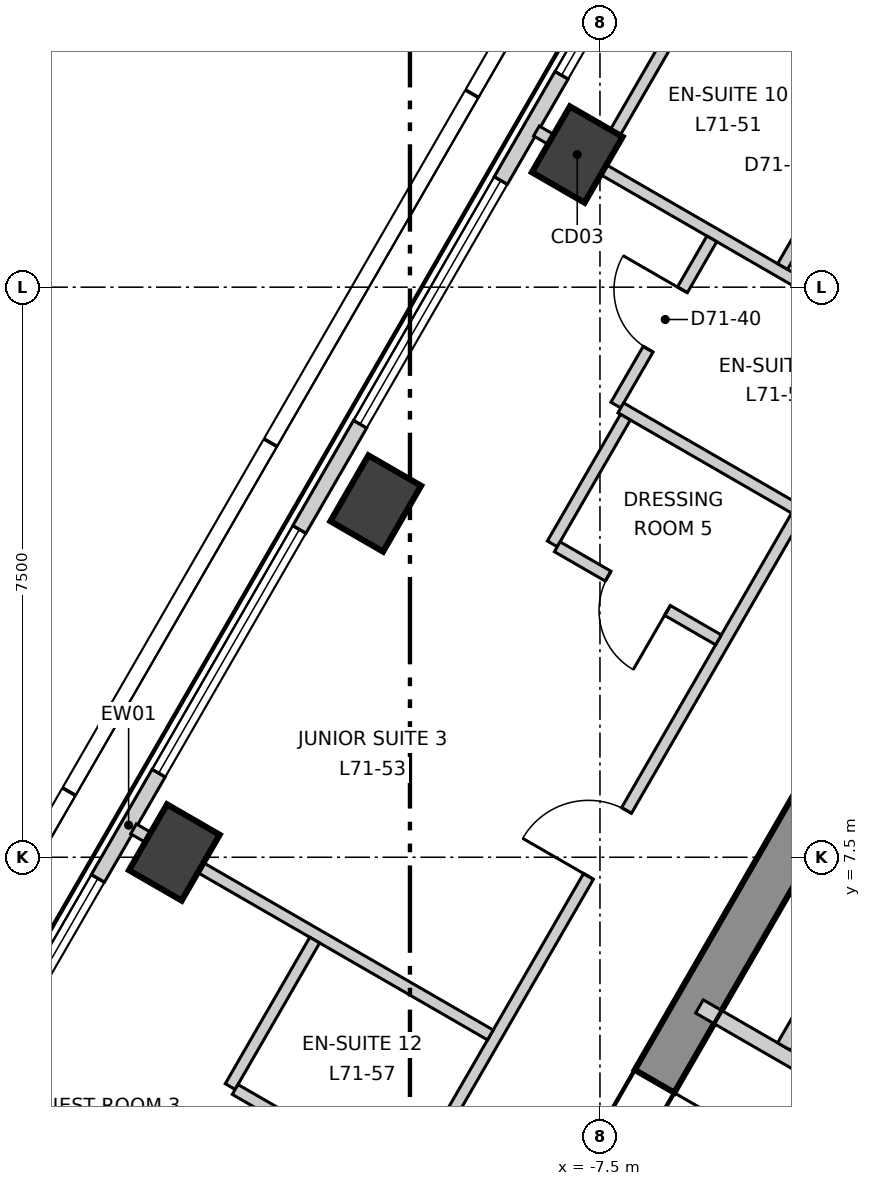
"""IFC4 building model, lengths in metres.
Left out: names, types, materials, properties, quantities, classifications, styles, units other than length and angle.
Written with IfcOpenShell. Run it as: python <this file> out.ifc"""

import sys

from ifc_helpers import new_model, si_unit, direction, frame, frame_2d, origin, origin_2d, place, context, subcontext, project, spatial, polyline, rectangle, outline, extrude, element, fill, save


model = new_model("IFC4")
c1 = context("Model", 3, precision=1e-05, world=origin(), true_north=direction((0.0, 1.0)))
c2 = subcontext(c1, "Body", "Model", "MODEL_VIEW")
j1 = project(units=[si_unit("LENGTHUNIT", "METRE"), si_unit("PLANEANGLEUNIT", "RADIAN")], contexts=[c1])
p1 = place(None, origin())
s1 = spatial("IfcSite", under=j1, at=p1, CompositionType="ELEMENT")
p2 = place(p1, origin())
s2 = spatial("IfcBuilding", under=s1, at=p2, CompositionType="ELEMENT")
p3 = place(p2, frame((0.0, 0.0, 300.7)))
s3 = spatial("IfcBuildingStorey", under=s2, at=p3, CompositionType="ELEMENT", Elevation=300.7)
p4 = place(p3, frame((-1.732, 13.3, -0.3), z_axis=(0.0, 0.0, 1.0), x_axis=(-0.500000539815, -0.866025092122, 0.0)))
e1 = element("IfcWall", 1, at=p4, inside=s3, PredefinedType="SHEAR", context=c2, shape_type="SweptSolid", body=[
    extrude(outline(polyline([(-0.173, -0.3), (1.795, -0.3), (3.763, -0.3), (5.732, -0.3), (7.7, -0.3), (9.668, -0.301), (11.637, -0.301), (13.605, -0.301), (15.573, -0.301), (17.542, -0.301), (19.51, -0.301), (21.478, -0.301), (21.131, 0.3), (19.226, 0.3), (17.321, 0.3), (15.415, 0.3), (13.51, 0.3), (11.605, 0.3), (9.699, 0.3), (7.794, 0.3), (5.889, 0.3), (3.984, 0.3), (2.078, 0.3), (0.173, 0.3), (-0.173, -0.3)])), origin(), (0.0, 0.0, 1.0), 3.6),
])
p5 = place(p4, frame((10.102, 0.0, 0.3)))
e2 = element("IfcOpeningElement", 2, at=p5, cuts=e1, PredefinedType="OPENING", context=c2, shape_type="SweptSolid", body=[
    extrude(rectangle(XDim=1.1, YDim=2.1, at=frame_2d((0.55, 1.05))), frame((0.0, 0.31, 0.0), z_axis=(0.0, -1.0, 0.0), x_axis=(1.0, 0.0, 0.0)), (0.0, 0.0, 1.0), 0.621),
])
p6 = place(p4, frame((16.378, 0.0, 0.3)))
e3 = element("IfcOpeningElement", 3, at=p6, cuts=e1, PredefinedType="OPENING", context=c2, shape_type="SweptSolid", body=[
    extrude(rectangle(XDim=0.9, YDim=2.1, at=frame_2d((0.45, 1.05))), frame((0.0, 0.31, 0.0), z_axis=(0.0, -1.0, 0.0), x_axis=(1.0, 0.0, 0.0)), (0.0, 0.0, 1.0), 0.621),
])
p7 = place(p4, frame((4.026, 0.0, 0.3)))
e4 = element("IfcOpeningElement", 4, at=p7, cuts=e1, PredefinedType="OPENING", context=c2, shape_type="SweptSolid", body=[
    extrude(rectangle(XDim=0.9, YDim=2.1, at=frame_2d((0.45, 1.05))), frame((0.0, 0.31, 0.0), z_axis=(0.0, -1.0, 0.0), x_axis=(1.0, 0.0, 0.0)), (0.0, 0.0, 1.0), 0.621),
])
for number, where, z_axis, x_axis in (
    (5, (-7.799, 16.745, -0.3), (0.0, 0.0, 1.0), (0.5, 0.866, 0.0)),
    (6, (-10.45, 12.154, -0.3), (0.0, 0.0, 1.0), (0.5, 0.866, 0.0)),
    (7, (-13.1, 7.563, -0.3), (0.0, 0.0, 1.0), (0.5, 0.866, 0.0)),
):
    element("IfcColumn", number, at=place(p3, frame(where, z_axis=z_axis, x_axis=x_axis)), inside=s3, PredefinedType="COLUMN", context=c2, shape_type="SweptSolid", body=[
        extrude(rectangle(XDim=1.0, YDim=0.8, at=origin_2d()), origin(), (0.0, 0.0, 1.0), 3.6),
    ])
p8 = place(p3, frame((-2.453, 27.405, 0.0), z_axis=(0.0, 0.0, 1.0), x_axis=(-0.500000041859, -0.866025379617, 0.0)))
e8 = element("IfcWall", 8, at=p8, inside=s3, PredefinedType="ELEMENTEDWALL", context=c2, shape_type="SweptSolid", body=[
    extrude(rectangle(XDim=44.994, YDim=0.2, at=frame_2d((22.497, 0.0))), origin(), (0.0, 0.0, 1.0), 3.3),
])
p9 = place(p8, frame((2.103, 0.0, 0.9)))
e9 = element("IfcOpeningElement", 9, at=p9, cuts=e8, PredefinedType="OPENING", context=c2, shape_type="SweptSolid", body=[
    extrude(rectangle(XDim=3.7, YDim=2.2, at=frame_2d((1.85, 1.1))), frame((0.0, 0.11, 0.0), z_axis=(0.0, -1.0, 0.0), x_axis=(1.0, 0.0, 0.0)), (0.0, 0.0, 1.0), 0.22),
])
p10 = place(p8, frame((7.404, 0.0, 0.9)))
e10 = element("IfcOpeningElement", 10, at=p10, cuts=e8, PredefinedType="OPENING", context=c2, shape_type="SweptSolid", body=[
    extrude(rectangle(XDim=3.7, YDim=2.2, at=frame_2d((1.85, 1.1))), frame((0.0, 0.11, 0.0), z_axis=(0.0, -1.0, 0.0), x_axis=(1.0, 0.0, 0.0)), (0.0, 0.0, 1.0), 0.22),
])
p11 = place(p8, frame((12.705, 0.0, 0.9)))
e11 = element("IfcOpeningElement", 11, at=p11, cuts=e8, PredefinedType="OPENING", context=c2, shape_type="SweptSolid", body=[
    extrude(rectangle(XDim=3.7, YDim=2.2, at=frame_2d((1.85, 1.1))), frame((0.0, 0.11, 0.0), z_axis=(0.0, -1.0, 0.0), x_axis=(1.0, 0.0, 0.0)), (0.0, 0.0, 1.0), 0.22),
])
p12 = place(p8, frame((18.006, 0.0, 0.9)))
e12 = element("IfcOpeningElement", 12, at=p12, cuts=e8, PredefinedType="OPENING", context=c2, shape_type="SweptSolid", body=[
    extrude(rectangle(XDim=3.7, YDim=2.2, at=frame_2d((1.85, 1.1))), frame((0.0, 0.11, 0.0), z_axis=(0.0, -1.0, 0.0), x_axis=(1.0, 0.0, 0.0)), (0.0, 0.0, 1.0), 0.22),
])
p13 = place(p8, frame((23.307, 0.0, 0.9)))
e13 = element("IfcOpeningElement", 13, at=p13, cuts=e8, PredefinedType="OPENING", context=c2, shape_type="SweptSolid", body=[
    extrude(rectangle(XDim=3.7, YDim=2.2, at=frame_2d((1.85, 1.1))), frame((0.0, 0.11, 0.0), z_axis=(0.0, -1.0, 0.0), x_axis=(1.0, 0.0, 0.0)), (0.0, 0.0, 1.0), 0.22),
])
p14 = place(p8, frame((28.608, 0.0, 0.9)))
e14 = element("IfcOpeningElement", 14, at=p14, cuts=e8, PredefinedType="OPENING", context=c2, shape_type="SweptSolid", body=[
    extrude(rectangle(XDim=3.7, YDim=2.2, at=frame_2d((1.85, 1.1))), frame((0.0, 0.11, 0.0), z_axis=(0.0, -1.0, 0.0), x_axis=(1.0, 0.0, 0.0)), (0.0, 0.0, 1.0), 0.22),
])
p15 = place(p8, frame((33.909, 0.0, 0.9)))
e15 = element("IfcOpeningElement", 15, at=p15, cuts=e8, PredefinedType="OPENING", context=c2, shape_type="SweptSolid", body=[
    extrude(rectangle(XDim=3.7, YDim=2.2, at=frame_2d((1.85, 1.1))), frame((0.0, 0.11, 0.0), z_axis=(0.0, -1.0, 0.0), x_axis=(1.0, 0.0, 0.0)), (0.0, 0.0, 1.0), 0.22),
])
p16 = place(p8, frame((39.21, 0.0, 0.9)))
e16 = element("IfcOpeningElement", 16, at=p16, cuts=e8, PredefinedType="OPENING", context=c2, shape_type="SweptSolid", body=[
    extrude(rectangle(XDim=3.7, YDim=2.2, at=frame_2d((1.85, 1.1))), frame((0.0, 0.11, 0.0), z_axis=(0.0, -1.0, 0.0), x_axis=(1.0, 0.0, 0.0)), (0.0, 0.0, 1.0), 0.22),
])
p17 = place(p3, frame((-17.679, -10.12, 0.0), z_axis=(0.0, 0.0, 1.0), x_axis=(0.500008955215, 0.866020233427, 0.0)))
e17 = element("IfcWall", 17, at=p17, inside=s3, PredefinedType="PARTITIONING", context=c2, shape_type="SweptSolid", body=[
    extrude(rectangle(XDim=35.357, YDim=0.15, at=frame_2d((17.679, 0.0))), origin(), (0.0, 0.0, 1.0), 3.3),
])
p18 = place(p17, frame((31.307, 0.0, 0.0)))
e18 = element("IfcOpeningElement", 18, at=p18, cuts=e17, PredefinedType="OPENING", context=c2, shape_type="SweptSolid", body=[
    extrude(rectangle(XDim=1.0, YDim=2.1, at=frame_2d((0.5, 1.05))), frame((0.0, 0.085, 0.0), z_axis=(0.0, -1.0, 0.0), x_axis=(1.0, 0.0, 0.0)), (0.0, 0.0, 1.0), 0.17),
])
p19 = place(p17, frame((20.056, 0.0, 0.0)))
e19 = element("IfcOpeningElement", 19, at=p19, cuts=e17, PredefinedType="OPENING", context=c2, shape_type="SweptSolid", body=[
    extrude(rectangle(XDim=1.0, YDim=2.1, at=frame_2d((0.5, 1.05))), frame((0.0, 0.085, 0.0), z_axis=(0.0, -1.0, 0.0), x_axis=(1.0, 0.0, 0.0)), (0.0, 0.0, 1.0), 0.17),
])
p20 = place(p17, frame((13.253, 0.0, 0.0)))
e20 = element("IfcOpeningElement", 20, at=p20, cuts=e17, PredefinedType="OPENING", context=c2, shape_type="SweptSolid", body=[
    extrude(rectangle(XDim=1.0, YDim=2.1, at=frame_2d((0.5, 1.05))), frame((0.0, 0.085, 0.0), z_axis=(0.0, -1.0, 0.0), x_axis=(1.0, 0.0, 0.0)), (0.0, 0.0, 1.0), 0.17),
])
p21 = place(p17, frame((7.653, 0.0, 0.0)))
e21 = element("IfcOpeningElement", 21, at=p21, cuts=e17, PredefinedType="OPENING", context=c2, shape_type="SweptSolid", body=[
    extrude(rectangle(XDim=1.0, YDim=2.1, at=frame_2d((0.5, 1.05))), frame((0.0, 0.085, 0.0), z_axis=(0.0, -1.0, 0.0), x_axis=(1.0, 0.0, 0.0)), (0.0, 0.0, 1.0), 0.17),
])
p22 = place(p17, frame((2.952, 0.0, 0.0)))
e22 = element("IfcOpeningElement", 22, at=p22, cuts=e17, PredefinedType="OPENING", context=c2, shape_type="SweptSolid", body=[
    extrude(rectangle(XDim=1.0, YDim=2.1, at=frame_2d((0.5, 1.05))), frame((0.0, 0.085, 0.0), z_axis=(0.0, -1.0, 0.0), x_axis=(1.0, 0.0, 0.0)), (0.0, 0.0, 1.0), 0.17),
])
p23 = place(p3, frame((-13.637, 7.873, 0.0), z_axis=(0.0, 0.0, 1.0), x_axis=(0.866006352826, -0.500032995777, 0.0)))
e23 = element("IfcWall", 23, at=p23, inside=s3, PredefinedType="PARTITIONING", context=c2, shape_type="SweptSolid", body=[
    extrude(rectangle(XDim=5.422, YDim=0.15, at=frame_2d((2.711, 0.0))), origin(), (0.0, 0.0, 1.0), 2.8),
])
p24 = place(p3, frame((-8.336, 17.055, 0.0), z_axis=(0.0, 0.0, 1.0), x_axis=(0.865995092734, -0.500052496605, 0.0)))
e24 = element("IfcWall", 24, at=p24, inside=s3, PredefinedType="PARTITIONING", context=c2, shape_type="SweptSolid", body=[
    extrude(rectangle(XDim=5.421, YDim=0.15, at=frame_2d((2.711, 0.0))), origin(), (0.0, 0.0, 1.0), 3.3),
])
p25 = place(p3, frame((-5.097, 15.272, 0.0), z_axis=(0.0, 0.0, 1.0), x_axis=(0.499994082372, 0.866028820302, 0.0)))
e25 = element("IfcWall", 25, at=p25, inside=s3, PredefinedType="PARTITIONING", context=c2, shape_type="SweptSolid", body=[
    extrude(rectangle(XDim=5.524, YDim=0.15, at=frame_2d((2.762, 0.0))), origin(), (0.0, 0.0, 1.0), 3.3),
])
p26 = place(p25, frame((1.075, 0.0, 0.0)))
e26 = element("IfcOpeningElement", 26, at=p26, cuts=e25, PredefinedType="OPENING", context=c2, shape_type="SweptSolid", body=[
    extrude(rectangle(XDim=0.9, YDim=2.1, at=frame_2d((0.45, 1.05))), frame((0.0, 0.085, 0.0), z_axis=(0.0, -1.0, 0.0), x_axis=(1.0, 0.0, 0.0)), (0.0, 0.0, 1.0), 0.17),
])
p27 = place(p3, frame((-7.512, 16.666, 0.0), z_axis=(0.0, 0.0, 1.0), x_axis=(0.500050108258, 0.865996471835, 0.0)))
e27 = element("IfcWall", 27, at=p27, inside=s3, PredefinedType="PARTITIONING", context=c2, shape_type="SweptSolid", body=[
    extrude(rectangle(XDim=5.525, YDim=0.15, at=frame_2d((2.763, 0.0))), origin(), (0.0, 0.0, 1.0), 2.6),
])
p28 = place(p3, frame((-7.291, 13.449, 0.0), z_axis=(0.0, 0.0, 1.0), x_axis=(0.500079482444, 0.865979509711, 0.0)))
e28 = element("IfcWall", 28, at=p28, inside=s3, PredefinedType="PARTITIONING", context=c2, shape_type="SweptSolid", body=[
    extrude(rectangle(XDim=2.525, YDim=0.15, at=frame_2d((1.263, 0.0))), origin(), (0.0, 0.0, 1.0), 3.3),
])
p29 = place(p28, frame((0.85, 0.0, 0.0)))
e29 = element("IfcOpeningElement", 29, at=p29, cuts=e28, PredefinedType="OPENING", context=c2, shape_type="SweptSolid", body=[
    extrude(rectangle(XDim=0.9, YDim=2.1, at=frame_2d((0.45, 1.05))), frame((0.0, 0.085, 0.0), z_axis=(0.0, -1.0, 0.0), x_axis=(1.0, 0.0, 0.0)), (0.0, 0.0, 1.0), 0.17),
])
p30 = place(p3, frame((-12.365, 4.483, 0.0), z_axis=(0.0, 0.0, 1.0), x_axis=(0.499833278392, 0.866121639155, 0.0)))
e30 = element("IfcWall", 30, at=p30, inside=s3, PredefinedType="PARTITIONING", context=c2, shape_type="SweptSolid", body=[
    extrude(rectangle(XDim=2.225, YDim=0.15, at=frame_2d((1.112, 0.0))), origin(), (0.0, 0.0, 1.0), 3.3),
])
p31 = place(p3, frame((-12.3, 4.445, 0.0), z_axis=(0.0, 0.0, 1.0), x_axis=(0.865965520905, -0.500103705848, 0.0)))
e31 = element("IfcWall", 31, at=p31, inside=s3, PredefinedType="PARTITIONING", context=c2, shape_type="SweptSolid", body=[
    extrude(rectangle(XDim=2.55, YDim=0.15, at=frame_2d((1.275, 0.0))), origin(), (0.0, 0.0, 1.0), 3.3),
])
p32 = place(p31, frame((0.875, 0.0, 0.0)))
e32 = element("IfcOpeningElement", 32, at=p32, cuts=e31, PredefinedType="OPENING", context=c2, shape_type="SweptSolid", body=[
    extrude(rectangle(XDim=0.9, YDim=2.1, at=frame_2d((0.45, 1.05))), frame((0.0, 0.085, 0.0), z_axis=(0.0, -1.0, 0.0), x_axis=(1.0, 0.0, 0.0)), (0.0, 0.0, 1.0), 0.17),
])
p33 = place(p3, frame((-7.226, 13.412, 0.0), z_axis=(0.0, 0.0, 1.0), x_axis=(0.866065407652, -0.499930704866, 0.0)))
e33 = element("IfcWall", 33, at=p33, inside=s3, PredefinedType="PARTITIONING", context=c2, shape_type="SweptSolid", body=[
    extrude(rectangle(XDim=2.638, YDim=0.15, at=frame_2d((1.319, 0.0))), origin(), (0.0, 0.0, 1.0), 3.3),
])
p34 = place(p3, frame((-8.127, 11.623, 0.0), z_axis=(0.0, 0.0, 1.0), x_axis=(0.499795662447, 0.866143345988, 0.0)))
e34 = element("IfcWall", 34, at=p34, inside=s3, PredefinedType="PARTITIONING", context=c2, shape_type="SweptSolid", body=[
    extrude(rectangle(XDim=1.925, YDim=0.15, at=frame_2d((0.962, 0.0))), origin(), (0.0, 0.0, 1.0), 3.3),
])
p35 = place(p3, frame((-8.062, 11.585, 0.0), z_axis=(0.0, 0.0, 1.0), x_axis=(0.865983065851, -0.500073324283, 0.0)))
e35 = element("IfcWall", 35, at=p35, inside=s3, PredefinedType="PARTITIONING", context=c2, shape_type="SweptSolid", body=[
    extrude(rectangle(XDim=2.449, YDim=0.15, at=frame_2d((1.225, 0.0))), origin(), (0.0, 0.0, 1.0), 3.3),
])
p36 = place(p35, frame((0.774, 0.0, 0.0)))
e36 = element("IfcOpeningElement", 36, at=p36, cuts=e35, PredefinedType="OPENING", context=c2, shape_type="SweptSolid", body=[
    extrude(rectangle(XDim=0.9, YDim=2.1, at=frame_2d((0.45, 1.05))), frame((0.0, 0.085, 0.0), z_axis=(0.0, -1.0, 0.0), x_axis=(1.0, 0.0, 0.0)), (0.0, 0.0, 1.0), 0.17),
])
p37 = place(p3, frame((-5.885, 19.335, 0.0), z_axis=(0.0, 0.0, 1.0), x_axis=(0.865881993967, -0.500248310865, 0.0)))
e37 = element("IfcWall", 37, at=p37, inside=s3, PredefinedType="PARTITIONING", context=c2, shape_type="SweptSolid", body=[
    extrude(rectangle(XDim=2.639, YDim=0.15, at=frame_2d((1.319, 0.0))), origin(), (0.0, 0.0, 1.0), 3.3),
])
p38 = place(p3, frame((-6.191, 5.537, 0.0), z_axis=(0.0, 0.0, 1.0), x_axis=(0.866052607023, -0.499952879648, 0.0)))
e38 = element("IfcWall", 38, at=p38, inside=s3, PredefinedType="SOLIDWALL", context=c2, shape_type="SweptSolid", body=[
    extrude(rectangle(XDim=3.332, YDim=0.2, at=frame_2d((1.666, 0.0))), origin(), (0.0, 0.0, 1.0), 3.3),
])
p39 = place(p38, frame((1.83, 0.0, 0.0)))
e39 = element("IfcOpeningElement", 39, at=p39, cuts=e38, PredefinedType="OPENING", context=c2, shape_type="SweptSolid", body=[
    extrude(rectangle(XDim=0.9, YDim=2.1, at=frame_2d((0.45, 1.05))), frame((0.0, 0.11, 0.0), z_axis=(0.0, -1.0, 0.0), x_axis=(1.0, 0.0, 0.0)), (0.0, 0.0, 1.0), 0.22),
])
p40 = place(p3, frame((-5.076, 5.009, 0.0), z_axis=(0.0, 0.0, 1.0), x_axis=(0.50002537861, 0.866010750942, 0.0)))
e40 = element("IfcWall", 40, at=p40, inside=s3, PredefinedType="SOLIDWALL", context=c2, shape_type="SweptSolid", body=[
    extrude(rectangle(XDim=3.0, YDim=0.2, at=frame_2d((1.5, 0.0))), origin(), (0.0, 0.0, 1.0), 3.3),
])
p41 = place(p10, origin())
e41 = element("IfcWindow", 41, at=p41, inside=s3, PartitioningType="SINGLE_PANEL", PredefinedType="WINDOW", context=c2, shape_type="SweptSolid", body=[
    extrude(rectangle(XDim=3.7, YDim=2.2, at=frame_2d((1.85, 1.1))), frame((0.0, 0.03, 0.0), z_axis=(0.0, -1.0, 0.0), x_axis=(1.0, 0.0, 0.0)), (0.0, 0.0, 1.0), 0.06),
])
fill(e10, e41)
p42 = place(p11, origin())
e42 = element("IfcWindow", 42, at=p42, inside=s3, PartitioningType="SINGLE_PANEL", PredefinedType="WINDOW", context=c2, shape_type="SweptSolid", body=[
    extrude(rectangle(XDim=3.7, YDim=2.2, at=frame_2d((1.85, 1.1))), frame((0.0, 0.03, 0.0), z_axis=(0.0, -1.0, 0.0), x_axis=(1.0, 0.0, 0.0)), (0.0, 0.0, 1.0), 0.06),
])
fill(e11, e42)
p43 = place(p12, origin())
e43 = element("IfcWindow", 43, at=p43, inside=s3, PartitioningType="SINGLE_PANEL", PredefinedType="WINDOW", context=c2, shape_type="SweptSolid", body=[
    extrude(rectangle(XDim=3.7, YDim=2.2, at=frame_2d((1.85, 1.1))), frame((0.0, 0.03, 0.0), z_axis=(0.0, -1.0, 0.0), x_axis=(1.0, 0.0, 0.0)), (0.0, 0.0, 1.0), 0.06),
])
fill(e12, e43)
p44 = place(p13, origin())
e44 = element("IfcWindow", 44, at=p44, inside=s3, PartitioningType="SINGLE_PANEL", PredefinedType="WINDOW", context=c2, shape_type="SweptSolid", body=[
    extrude(rectangle(XDim=3.7, YDim=2.2, at=frame_2d((1.85, 1.1))), frame((0.0, 0.03, 0.0), z_axis=(0.0, -1.0, 0.0), x_axis=(1.0, 0.0, 0.0)), (0.0, 0.0, 1.0), 0.06),
])
fill(e13, e44)
p45 = place(p19, origin())
e45 = element("IfcDoor", 45, at=p45, inside=s3, OperationType="SINGLE_SWING_RIGHT", PredefinedType="DOOR", context=c2, shape_type="SweptSolid", body=[
    extrude(rectangle(XDim=1.0, YDim=2.1, at=frame_2d((0.5, 1.05))), frame((0.0, 0.025, 0.0), z_axis=(0.0, -1.0, 0.0), x_axis=(1.0, 0.0, 0.0)), (0.0, 0.0, 1.0), 0.05),
])
fill(e19, e45)
p46 = place(p29, origin())
e46 = element("IfcDoor", 46, at=p46, inside=s3, OperationType="SINGLE_SWING_LEFT", PredefinedType="DOOR", context=c2, shape_type="SweptSolid", body=[
    extrude(rectangle(XDim=0.9, YDim=2.1, at=frame_2d((0.45, 1.05))), frame((0.0, 0.025, 0.0), z_axis=(0.0, -1.0, 0.0), x_axis=(1.0, 0.0, 0.0)), (0.0, 0.0, 1.0), 0.05),
])
fill(e29, e46)
p47 = place(p36, origin())
e47 = element("IfcDoor", 47, at=p47, inside=s3, OperationType="SINGLE_SWING_RIGHT", PredefinedType="DOOR", context=c2, shape_type="SweptSolid", body=[
    extrude(rectangle(XDim=0.9, YDim=2.1, at=frame_2d((0.45, 1.05))), frame((0.0, 0.025, 0.0), z_axis=(0.0, -1.0, 0.0), x_axis=(1.0, 0.0, 0.0)), (0.0, 0.0, 1.0), 0.05),
])
fill(e36, e47)
p48 = place(p5, origin())
e48 = element("IfcDoor", 48, at=p48, inside=s3, OperationType="SINGLE_SWING_RIGHT", PredefinedType="DOOR", context=c2, shape_type="SweptSolid", body=[
    extrude(rectangle(XDim=1.1, YDim=2.1, at=frame_2d((0.55, 1.05))), frame((0.0, 0.025, 0.0), z_axis=(0.0, -1.0, 0.0), x_axis=(1.0, 0.0, 0.0)), (0.0, 0.0, 1.0), 0.05),
])
fill(e2, e48)
save(model, sys.argv[1])
